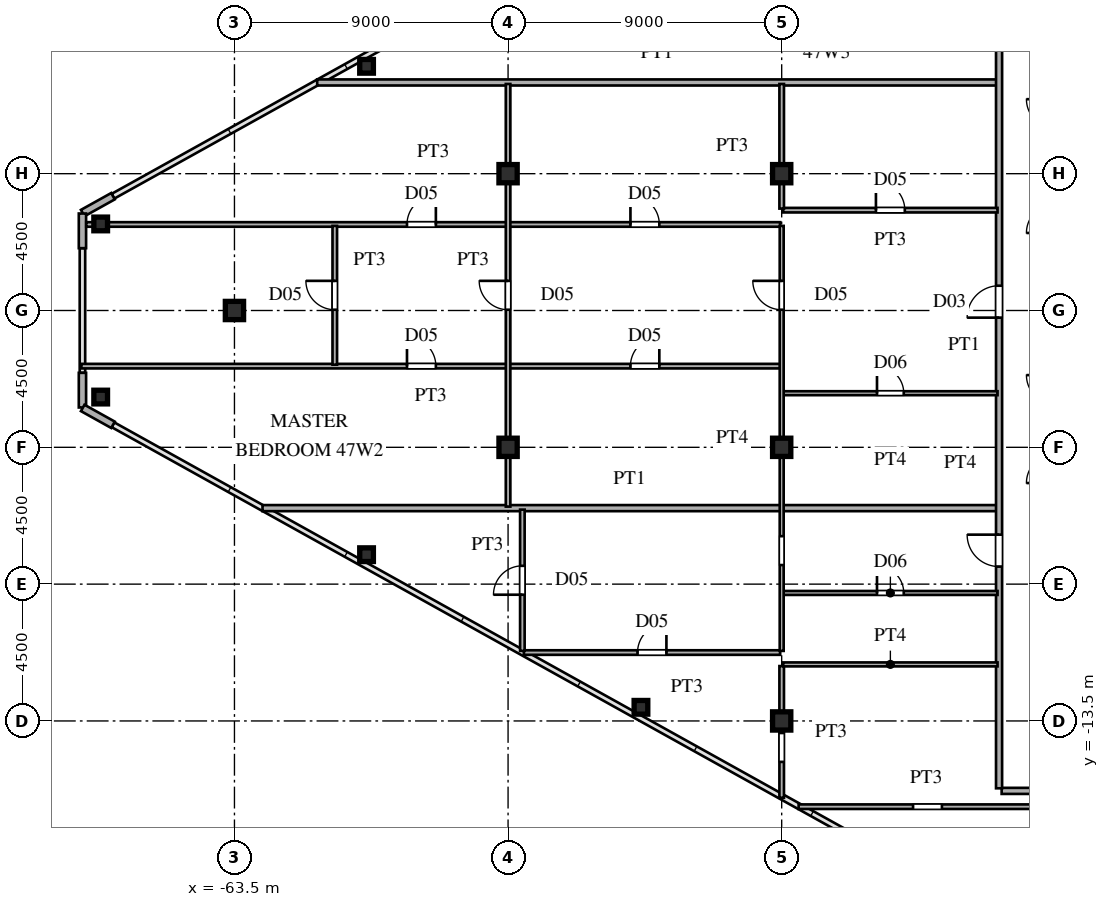
"""IFC4 building model, lengths in metres.
Left out: names, types, materials, properties, quantities, classifications, styles, units other than length and angle.
Written with IfcOpenShell. Run it as: python <this file> out.ifc"""

import sys

from ifc_helpers import new_model, si_unit, direction, frame, frame_2d, origin, origin_2d, place, context, subcontext, project, spatial, rectangle, hollow_rectangle, i_section, extrude, source, transform, mapped, element, fill, save


model = new_model("IFC4")
c1 = context("Model", 3, precision=1e-05, world=origin(), true_north=direction((0.0, 1.0)))
c2 = subcontext(c1, "Body", "Model", "MODEL_VIEW")
j1 = project(units=[si_unit("LENGTHUNIT", "METRE"), si_unit("PLANEANGLEUNIT", "RADIAN")], contexts=[c1])
p1 = place(None, origin())
s1 = spatial("IfcSite", under=j1, at=p1, CompositionType="ELEMENT")
p2 = place(p1, origin())
s2 = spatial("IfcBuilding", under=s1, at=p2, CompositionType="ELEMENT")
p3 = place(p2, frame((0.0, 0.0, 177.9)))
s3 = spatial("IfcBuildingStorey", under=s2, at=p3, CompositionType="ELEMENT", Elevation=177.9)
m1 = source(origin(), c2, "Body", "SweptSolid", [
    extrude(i_section(OverallWidth=0.6, OverallDepth=0.6, WebThickness=0.025, FlangeThickness=0.04, at=origin_2d()), origin(), (0.0, 0.0, 1.0), 3.6),
])
for number, where, z_axis, x_axis in (
    (1, (-45.5, -13.5, 0.0), (0.0, 0.0, 1.0), (1.0, 0.0, 0.0)),
    (2, (-45.5, -4.5, 0.0), (0.0, 0.0, 1.0), (1.0, 0.0, 0.0)),
    (3, (-45.5, 4.5, 0.0), (0.0, 0.0, 1.0), (1.0, 0.0, 0.0)),
    (4, (-54.5, -4.5, 0.0), (0.0, 0.0, 1.0), (1.0, 0.0, 0.0)),
    (5, (-54.5, 4.5, 0.0), (0.0, 0.0, 1.0), (1.0, 0.0, 0.0)),
    (6, (-63.5, 0.0, 0.0), (0.0, 0.0, 1.0), (1.0, 0.0, 0.0)),
):
    element("IfcColumn", number, at=place(p3, frame(where, z_axis=z_axis, x_axis=x_axis)), inside=s3, PredefinedType="COLUMN", context=c2, shape_type="MappedRepresentation", body=[
        mapped(m1, transform((0.0, 0.0, 0.0), scale=1.0)),
    ])
m2 = source(origin(), c2, "Body", "SweptSolid", [
    extrude(hollow_rectangle(XDim=0.45, YDim=0.45, WallThickness=0.018, at=origin_2d()), origin(), (0.0, 0.0, 1.0), 3.6),
])
for number, where, z_axis, x_axis in (
    (7, (-67.9, 2.847, 0.0), (0.0, 0.0, 1.0), (1.0, 0.0, 0.0)),
    (8, (-67.9, -2.847, 0.0), (0.0, 0.0, 1.0), (1.0, 0.0, 0.0)),
    (9, (-50.129, -13.051, 0.0), (0.0, 0.0, 1.0), (1.0, 0.0, 0.0)),
    (10, (-59.155, -8.031, 0.0), (0.0, 0.0, 1.0), (1.0, 0.0, 0.0)),
    (11, (-59.155, 8.031, 0.0), (0.0, 0.0, 1.0), (1.0, 0.0, 0.0)),
):
    element("IfcColumn", number, at=place(p3, frame(where, z_axis=z_axis, x_axis=x_axis)), inside=s3, PredefinedType="COLUMN", context=c2, shape_type="MappedRepresentation", body=[
        mapped(m2, transform((0.0, 0.0, 0.0), scale=1.0)),
    ])
for number, where, z_axis, x_axis in (
    (12, (-67.495, 3.759, 0.0), (0.0, 0.0, 1.0), (-0.874, -0.486, 0.0)),
    (13, (-68.5, 3.19, 0.0), (0.0, 0.0, 1.0), (0.0, -1.0, 0.0)),
    (14, (-68.5, -2.05, 0.0), (0.0, 0.0, 1.0), (0.0, -1.0, 0.0)),
    (15, (-68.491, -3.205, 0.0), (0.0, 0.0, 1.0), (0.874, -0.486, 0.0)),
):
    element("IfcWall", number, at=place(p3, frame(where, z_axis=z_axis, x_axis=x_axis)), inside=s3, PredefinedType="SOLIDWALL", context=c2, shape_type="SweptSolid", body=[
        extrude(rectangle(XDim=1.14, YDim=0.24, at=frame_2d((0.57, 0.0))), origin(), (0.0, 0.0, 1.0), 3.38),
    ])
p4 = place(p3, frame((-44.943, -16.32, 0.0), z_axis=(0.0, 0.0, 1.0), x_axis=(1.0, 0.0, 0.0)))
e16 = element("IfcWall", 16, at=p4, inside=s3, PredefinedType="PARTITIONING", context=c2, shape_type="SweptSolid", body=[
    extrude(rectangle(XDim=8.393, YDim=0.15, at=frame_2d((4.197, 0.0))), origin(), (0.0, 0.0, 1.0), 3.38),
])
p5 = place(p4, frame((3.764, 0.0, 0.0)))
e17 = element("IfcOpeningElement", 17, at=p5, cuts=e16, PredefinedType="OPENING", context=c2, shape_type="SweptSolid", body=[
    extrude(rectangle(XDim=0.95, YDim=2.15, at=frame_2d((0.475, 1.075))), frame((0.0, 0.085, 0.0), z_axis=(0.0, -1.0, 0.0), x_axis=(1.0, 0.0, 0.0)), (0.0, 0.0, 1.0), 0.17),
])
p6 = place(p3, frame((-38.265, -15.8, 0.0), z_axis=(0.0, 0.0, 1.0), x_axis=(1.0, 0.0, 0.0)))
e18 = element("IfcWall", 18, at=p6, inside=s3, PredefinedType="PARTITIONING", context=c2, shape_type="SweptSolid", body=[
    extrude(rectangle(XDim=10.765, YDim=0.2, at=frame_2d((5.382, 0.0))), origin(), (0.0, 0.0, 1.0), 3.38),
])
p7 = place(p3, frame((-45.45, -11.64, 0.0), z_axis=(0.0, 0.0, 1.0), x_axis=(1.0, 0.0, 0.0)))
e19 = element("IfcWall", 19, at=p7, inside=s3, PredefinedType="PARTITIONING", context=c2, shape_type="SweptSolid", body=[
    extrude(rectangle(XDim=7.05, YDim=0.13, at=frame_2d((3.525, 0.0))), origin(), (0.0, 0.0, 1.0), 3.38),
])
p8 = place(p3, frame((-53.983, -11.25, 0.0), z_axis=(0.0, 0.0, 1.0), x_axis=(1.0, 0.0, 0.0)))
e20 = element("IfcWall", 20, at=p8, inside=s3, PredefinedType="PARTITIONING", context=c2, shape_type="SweptSolid", body=[
    extrude(rectangle(XDim=8.433, YDim=0.15, at=frame_2d((4.216, 0.0))), origin(), (0.0, 0.0, 1.0), 3.38),
])
p9 = place(p8, frame((3.741, 0.0, 0.0)))
e21 = element("IfcOpeningElement", 21, at=p9, cuts=e20, PredefinedType="OPENING", context=c2, shape_type="SweptSolid", body=[
    extrude(rectangle(XDim=0.95, YDim=2.15, at=frame_2d((0.475, 1.075))), frame((0.0, 0.085, 0.0), z_axis=(0.0, -1.0, 0.0), x_axis=(1.0, 0.0, 0.0)), (0.0, 0.0, 1.0), 0.17),
])
p10 = place(p3, frame((-45.45, -9.29, 0.0), z_axis=(0.0, 0.0, 1.0), x_axis=(1.0, 0.0, 0.0)))
e22 = element("IfcWall", 22, at=p10, inside=s3, PredefinedType="PARTITIONING", context=c2, shape_type="SweptSolid", body=[
    extrude(rectangle(XDim=7.05, YDim=0.13, at=frame_2d((3.525, 0.0))), origin(), (0.0, 0.0, 1.0), 3.38),
])
p11 = place(p10, frame((3.085, 0.0, 0.0)))
e23 = element("IfcOpeningElement", 23, at=p11, cuts=e22, PredefinedType="OPENING", context=c2, shape_type="SweptSolid", body=[
    extrude(rectangle(XDim=0.88, YDim=2.1, at=frame_2d((0.44, 1.05))), frame((0.0, 0.075, 0.0), z_axis=(0.0, -1.0, 0.0), x_axis=(1.0, 0.0, 0.0)), (0.0, 0.0, 1.0), 0.15),
])
p12 = place(p3, frame((-62.577, -6.5, 0.0), z_axis=(0.0, 0.0, 1.0), x_axis=(1.0, 0.0, 0.0)))
e24 = element("IfcWall", 24, at=p12, inside=s3, PredefinedType="PARTITIONING", context=c2, shape_type="SweptSolid", body=[
    extrude(rectangle(XDim=24.147, YDim=0.2, at=frame_2d((12.073, 0.0))), origin(), (0.0, 0.0, 1.0), 3.38),
])
p13 = place(p3, frame((-45.45, -2.72, 0.0), z_axis=(0.0, 0.0, 1.0), x_axis=(1.0, 0.0, 0.0)))
e25 = element("IfcWall", 25, at=p13, inside=s3, PredefinedType="PARTITIONING", context=c2, shape_type="SweptSolid", body=[
    extrude(rectangle(XDim=7.05, YDim=0.13, at=frame_2d((3.525, 0.0))), origin(), (0.0, 0.0, 1.0), 3.38),
])
p14 = place(p13, frame((3.085, 0.0, 0.0)))
e26 = element("IfcOpeningElement", 26, at=p14, cuts=e25, PredefinedType="OPENING", context=c2, shape_type="SweptSolid", body=[
    extrude(rectangle(XDim=0.88, YDim=2.1, at=frame_2d((0.44, 1.05))), frame((0.0, 0.075, 0.0), z_axis=(0.0, -1.0, 0.0), x_axis=(1.0, 0.0, 0.0)), (0.0, 0.0, 1.0), 0.15),
])
p15 = place(p3, frame((-68.535, -1.83, 0.0), z_axis=(0.0, 0.0, 1.0), x_axis=(1.0, 0.0, 0.0)))
e27 = element("IfcWall", 27, at=p15, inside=s3, PredefinedType="PARTITIONING", context=c2, shape_type="SweptSolid", body=[
    extrude(rectangle(XDim=22.985, YDim=0.15, at=frame_2d((11.492, 0.0))), origin(), (0.0, 0.0, 1.0), 3.38),
])
p16 = place(p15, frame((18.06, 0.0, 0.0)))
e28 = element("IfcOpeningElement", 28, at=p16, cuts=e27, PredefinedType="OPENING", context=c2, shape_type="SweptSolid", body=[
    extrude(rectangle(XDim=0.95, YDim=2.15, at=frame_2d((0.475, 1.075))), frame((0.0, 0.085, 0.0), z_axis=(0.0, -1.0, 0.0), x_axis=(1.0, 0.0, 0.0)), (0.0, 0.0, 1.0), 0.17),
])
p17 = place(p15, frame((10.71, 0.0, 0.0)))
e29 = element("IfcOpeningElement", 29, at=p17, cuts=e27, PredefinedType="OPENING", context=c2, shape_type="SweptSolid", body=[
    extrude(rectangle(XDim=0.95, YDim=2.15, at=frame_2d((0.475, 1.075))), frame((0.0, 0.085, 0.0), z_axis=(0.0, -1.0, 0.0), x_axis=(1.0, 0.0, 0.0)), (0.0, 0.0, 1.0), 0.17),
])
p18 = place(p3, frame((-68.375, 2.83, 0.0), z_axis=(0.0, 0.0, 1.0), x_axis=(1.0, 0.0, 0.0)))
e30 = element("IfcWall", 30, at=p18, inside=s3, PredefinedType="PARTITIONING", context=c2, shape_type="SweptSolid", body=[
    extrude(rectangle(XDim=22.825, YDim=0.15, at=frame_2d((11.413, 0.0))), origin(), (0.0, 0.0, 1.0), 3.38),
])
p19 = place(p18, frame((17.9, 0.0, 0.0)))
e31 = element("IfcOpeningElement", 31, at=p19, cuts=e30, PredefinedType="OPENING", context=c2, shape_type="SweptSolid", body=[
    extrude(rectangle(XDim=0.95, YDim=2.15, at=frame_2d((0.475, 1.075))), frame((0.0, 0.085, 0.0), z_axis=(0.0, -1.0, 0.0), x_axis=(1.0, 0.0, 0.0)), (0.0, 0.0, 1.0), 0.17),
])
p20 = place(p18, frame((10.55, 0.0, 0.0)))
e32 = element("IfcOpeningElement", 32, at=p20, cuts=e30, PredefinedType="OPENING", context=c2, shape_type="SweptSolid", body=[
    extrude(rectangle(XDim=0.95, YDim=2.15, at=frame_2d((0.475, 1.075))), frame((0.0, 0.085, 0.0), z_axis=(0.0, -1.0, 0.0), x_axis=(1.0, 0.0, 0.0)), (0.0, 0.0, 1.0), 0.17),
])
p21 = place(p3, frame((-45.45, 3.3, 0.0), z_axis=(0.0, 0.0, 1.0), x_axis=(1.0, 0.0, 0.0)))
e33 = element("IfcWall", 33, at=p21, inside=s3, PredefinedType="PARTITIONING", context=c2, shape_type="SweptSolid", body=[
    extrude(rectangle(XDim=7.05, YDim=0.15, at=frame_2d((3.525, 0.0))), origin(), (0.0, 0.0, 1.0), 3.38),
])
p22 = place(p21, frame((3.05, 0.0, 0.0)))
e34 = element("IfcOpeningElement", 34, at=p22, cuts=e33, PredefinedType="OPENING", context=c2, shape_type="SweptSolid", body=[
    extrude(rectangle(XDim=0.95, YDim=2.15, at=frame_2d((0.475, 1.075))), frame((0.0, 0.085, 0.0), z_axis=(0.0, -1.0, 0.0), x_axis=(1.0, 0.0, 0.0)), (0.0, 0.0, 1.0), 0.17),
])
p23 = place(p3, frame((-60.779, 7.5, 0.0), z_axis=(0.0, 0.0, 1.0), x_axis=(1.0, 0.0, 0.0)))
e35 = element("IfcWall", 35, at=p23, inside=s3, PredefinedType="PARTITIONING", context=c2, shape_type="SweptSolid", body=[
    extrude(rectangle(XDim=22.349, YDim=0.2, at=frame_2d((11.175, 0.0))), origin(), (0.0, 0.0, 1.0), 3.38),
])
p24 = place(p3, frame((-60.2, -1.783, 0.0), z_axis=(0.0, 0.0, 1.0), x_axis=(0.0, 1.0, 0.0)))
e36 = element("IfcWall", 36, at=p24, inside=s3, PredefinedType="PARTITIONING", context=c2, shape_type="SweptSolid", body=[
    extrude(rectangle(XDim=4.566, YDim=0.15, at=frame_2d((2.283, 0.0))), origin(), (0.0, 0.0, 1.0), 3.38),
])
p25 = place(p24, frame((1.808, 0.0, 0.0)))
e37 = element("IfcOpeningElement", 37, at=p25, cuts=e36, PredefinedType="OPENING", context=c2, shape_type="SweptSolid", body=[
    extrude(rectangle(XDim=0.95, YDim=2.15, at=frame_2d((0.475, 1.075))), frame((0.0, 0.085, 0.0), z_axis=(0.0, -1.0, 0.0), x_axis=(1.0, 0.0, 0.0)), (0.0, 0.0, 1.0), 0.17),
])
p26 = place(p3, frame((-54.5, -6.45, 0.0), z_axis=(0.0, 0.0, 1.0), x_axis=(0.0, 1.0, 0.0)))
e38 = element("IfcWall", 38, at=p26, inside=s3, PredefinedType="PARTITIONING", context=c2, shape_type="SweptSolid", body=[
    extrude(rectangle(XDim=13.9, YDim=0.15, at=frame_2d((6.95, 0.0))), origin(), (0.0, 0.0, 1.0), 2.78),
])
p27 = place(p26, frame((6.475, 0.0, 0.0)))
e39 = element("IfcOpeningElement", 39, at=p27, cuts=e38, PredefinedType="OPENING", context=c2, shape_type="SweptSolid", body=[
    extrude(rectangle(XDim=0.95, YDim=2.15, at=frame_2d((0.475, 1.075))), frame((0.0, 0.085, 0.0), z_axis=(0.0, -1.0, 0.0), x_axis=(1.0, 0.0, 0.0)), (0.0, 0.0, 1.0), 0.17),
])
p28 = place(p3, frame((-54.03, -11.196, 0.0), z_axis=(0.0, 0.0, 1.0), x_axis=(0.0, 1.0, 0.0)))
e40 = element("IfcWall", 40, at=p28, inside=s3, PredefinedType="PARTITIONING", context=c2, shape_type="SweptSolid", body=[
    extrude(rectangle(XDim=4.646, YDim=0.15, at=frame_2d((2.323, 0.0))), origin(), (0.0, 0.0, 1.0), 3.38),
])
p29 = place(p28, frame((1.848, 0.0, 0.0)))
e41 = element("IfcOpeningElement", 41, at=p29, cuts=e40, PredefinedType="OPENING", context=c2, shape_type="SweptSolid", body=[
    extrude(rectangle(XDim=0.95, YDim=2.15, at=frame_2d((0.475, 1.075))), frame((0.0, 0.085, 0.0), z_axis=(0.0, -1.0, 0.0), x_axis=(1.0, 0.0, 0.0)), (0.0, 0.0, 1.0), 0.17),
])
p30 = place(p3, frame((-45.5, -16.027, 0.0), z_axis=(0.0, 0.0, 1.0), x_axis=(0.0, 1.0, 0.0)))
e42 = element("IfcWall", 42, at=p30, inside=s3, PredefinedType="PARTITIONING", context=c2, shape_type="SweptSolid", body=[
    extrude(rectangle(XDim=4.332, YDim=0.15, at=frame_2d((2.166, 0.0))), origin(), (0.0, 0.0, 1.0), 2.78),
])
p31 = place(p30, frame((1.181, 0.0, 0.0)))
e43 = element("IfcOpeningElement", 43, at=p31, cuts=e42, PredefinedType="OPENING", context=c2, shape_type="SweptSolid", body=[
    extrude(rectangle(XDim=0.95, YDim=2.15, at=frame_2d((0.475, 1.075))), frame((0.0, 0.085, 0.0), z_axis=(0.0, -1.0, 0.0), x_axis=(1.0, 0.0, 0.0)), (0.0, 0.0, 1.0), 0.17),
])
p32 = place(p3, frame((-45.5, -11.196, 0.0), z_axis=(0.0, 0.0, 1.0), x_axis=(0.0, 1.0, 0.0)))
e44 = element("IfcWall", 44, at=p32, inside=s3, PredefinedType="PARTITIONING", context=c2, shape_type="SweptSolid", body=[
    extrude(rectangle(XDim=13.979, YDim=0.13, at=frame_2d((6.99, 0.0))), origin(), (0.0, 0.0, 1.0), 2.78),
])
p33 = place(p32, frame((2.823, 0.0, 0.0)))
e45 = element("IfcOpeningElement", 45, at=p33, cuts=e44, PredefinedType="OPENING", context=c2, shape_type="SweptSolid", body=[
    extrude(rectangle(XDim=0.95, YDim=2.15, at=frame_2d((0.475, 1.075))), frame((0.0, 0.075, 0.0), z_axis=(0.0, -1.0, 0.0), x_axis=(1.0, 0.0, 0.0)), (0.0, 0.0, 1.0), 0.15),
])
p34 = place(p32, frame((11.221, 0.0, 0.0)))
e46 = element("IfcOpeningElement", 46, at=p34, cuts=e44, PredefinedType="OPENING", context=c2, shape_type="SweptSolid", body=[
    extrude(rectangle(XDim=0.95, YDim=2.15, at=frame_2d((0.475, 1.075))), frame((0.0, 0.075, 0.0), z_axis=(0.0, -1.0, 0.0), x_axis=(1.0, 0.0, 0.0)), (0.0, 0.0, 1.0), 0.15),
])
p35 = place(p3, frame((-45.5, 3.352, 0.0), z_axis=(0.0, 0.0, 1.0), x_axis=(0.0, 1.0, 0.0)))
e47 = element("IfcWall", 47, at=p35, inside=s3, PredefinedType="PARTITIONING", context=c2, shape_type="SweptSolid", body=[
    extrude(rectangle(XDim=4.098, YDim=0.15, at=frame_2d((2.049, 0.0))), origin(), (0.0, 0.0, 1.0), 2.78),
])
p36 = place(p3, frame((-38.35, -15.715, 0.0), z_axis=(0.0, 0.0, 1.0), x_axis=(0.0, 1.0, 0.0)))
e48 = element("IfcWall", 48, at=p36, inside=s3, PredefinedType="PARTITIONING", context=c2, shape_type="SweptSolid", body=[
    extrude(rectangle(XDim=31.43, YDim=0.2, at=frame_2d((15.715, 0.0))), origin(), (0.0, 0.0, 1.0), 3.38),
])
p37 = place(p36, frame((7.292, 0.0, 0.0)))
e49 = element("IfcOpeningElement", 49, at=p37, cuts=e48, PredefinedType="OPENING", context=c2, shape_type="SweptSolid", body=[
    extrude(rectangle(XDim=1.05, YDim=2.25, at=frame_2d((0.525, 1.125))), frame((0.0, 0.11, 0.0), z_axis=(0.0, -1.0, 0.0), x_axis=(1.0, 0.0, 0.0)), (0.0, 0.0, 1.0), 0.22),
])
p38 = place(p36, frame((15.48, 0.0, 0.0)))
e50 = element("IfcOpeningElement", 50, at=p38, cuts=e48, PredefinedType="OPENING", context=c2, shape_type="SweptSolid", body=[
    extrude(rectangle(XDim=1.05, YDim=2.25, at=frame_2d((0.525, 1.125))), frame((0.0, 0.11, 0.0), z_axis=(0.0, -1.0, 0.0), x_axis=(1.0, 0.0, 0.0)), (0.0, 0.0, 1.0), 0.22),
])
p39 = place(p36, frame((26.84, 0.0, 0.0)))
e51 = element("IfcOpeningElement", 51, at=p39, cuts=e48, PredefinedType="OPENING", context=c2, shape_type="SweptSolid", body=[
    extrude(rectangle(XDim=1.05, YDim=2.25, at=frame_2d((0.525, 1.125))), frame((0.0, 0.11, 0.0), z_axis=(0.0, -1.0, 0.0), x_axis=(1.0, 0.0, 0.0)), (0.0, 0.0, 1.0), 0.22),
])
m3 = source(origin(), c2, "Body", "SweptSolid", [
    extrude(rectangle(XDim=0.95, YDim=2.15, at=frame_2d((0.475, 1.075))), frame((0.0, 0.025, 0.0), z_axis=(0.0, -1.0, 0.0), x_axis=(1.0, 0.0, 0.0)), (0.0, 0.0, 1.0), 0.05),
])
p40 = place(p9, origin())
e52 = element("IfcDoor", 52, at=p40, inside=s3, OperationType="SINGLE_SWING_RIGHT", PredefinedType="DOOR", context=c2, shape_type="MappedRepresentation", body=[
    mapped(m3, transform((0.0, 0.0, 0.0), scale=1.0)),
])
fill(e21, e52)
m4 = source(origin(), c2, "Body", "SweptSolid", [
    extrude(rectangle(XDim=0.88, YDim=2.1, at=frame_2d((0.44, 1.05))), frame((0.0, 0.025, 0.0), z_axis=(0.0, -1.0, 0.0), x_axis=(1.0, 0.0, 0.0)), (0.0, 0.0, 1.0), 0.05),
])
p41 = place(p11, origin())
e53 = element("IfcDoor", 53, at=p41, inside=s3, OperationType="SINGLE_SWING_LEFT", PredefinedType="DOOR", context=c2, shape_type="MappedRepresentation", body=[
    mapped(m4, transform((0.0, 0.0, 0.0), scale=1.0)),
])
fill(e23, e53)
p42 = place(p14, origin())
e54 = element("IfcDoor", 54, at=p42, inside=s3, OperationType="SINGLE_SWING_LEFT", PredefinedType="DOOR", context=c2, shape_type="MappedRepresentation", body=[
    mapped(m4, transform((0.0, 0.0, 0.0), scale=1.0)),
])
fill(e26, e54)
p43 = place(p16, origin())
e55 = element("IfcDoor", 55, at=p43, inside=s3, OperationType="SINGLE_SWING_RIGHT", PredefinedType="DOOR", context=c2, shape_type="MappedRepresentation", body=[
    mapped(m3, transform((0.0, 0.0, 0.0), scale=1.0)),
])
fill(e28, e55)
p44 = place(p17, origin())
e56 = element("IfcDoor", 56, at=p44, inside=s3, OperationType="SINGLE_SWING_LEFT", PredefinedType="DOOR", context=c2, shape_type="MappedRepresentation", body=[
    mapped(m3, transform((0.0, 0.0, 0.0), scale=1.0)),
])
fill(e29, e56)
p45 = place(p19, origin())
e57 = element("IfcDoor", 57, at=p45, inside=s3, OperationType="SINGLE_SWING_LEFT", PredefinedType="DOOR", context=c2, shape_type="MappedRepresentation", body=[
    mapped(m3, transform((0.0, 0.0, 0.0), scale=1.0)),
])
fill(e31, e57)
p46 = place(p20, origin())
e58 = element("IfcDoor", 58, at=p46, inside=s3, OperationType="SINGLE_SWING_RIGHT", PredefinedType="DOOR", context=c2, shape_type="MappedRepresentation", body=[
    mapped(m3, transform((0.0, 0.0, 0.0), scale=1.0)),
])
fill(e32, e58)
p47 = place(p22, origin())
e59 = element("IfcDoor", 59, at=p47, inside=s3, OperationType="SINGLE_SWING_LEFT", PredefinedType="DOOR", context=c2, shape_type="MappedRepresentation", body=[
    mapped(m3, transform((0.0, 0.0, 0.0), scale=1.0)),
])
fill(e34, e59)
p48 = place(p25, origin())
e60 = element("IfcDoor", 60, at=p48, inside=s3, OperationType="SINGLE_SWING_RIGHT", PredefinedType="DOOR", context=c2, shape_type="MappedRepresentation", body=[
    mapped(m3, transform((0.0, 0.0, 0.0), scale=1.0)),
])
fill(e37, e60)
p49 = place(p27, origin())
e61 = element("IfcDoor", 61, at=p49, inside=s3, OperationType="SINGLE_SWING_RIGHT", PredefinedType="DOOR", context=c2, shape_type="MappedRepresentation", body=[
    mapped(m3, transform((0.0, 0.0, 0.0), scale=1.0)),
])
fill(e39, e61)
p50 = place(p29, origin())
e62 = element("IfcDoor", 62, at=p50, inside=s3, OperationType="SINGLE_SWING_LEFT", PredefinedType="DOOR", context=c2, shape_type="MappedRepresentation", body=[
    mapped(m3, transform((0.0, 0.0, 0.0), scale=1.0)),
])
fill(e41, e62)
p51 = place(p34, origin())
e63 = element("IfcDoor", 63, at=p51, inside=s3, OperationType="SINGLE_SWING_RIGHT", PredefinedType="DOOR", context=c2, shape_type="MappedRepresentation", body=[
    mapped(m3, transform((0.0, 0.0, 0.0), scale=1.0)),
])
fill(e46, e63)
m5 = source(origin(), c2, "Body", "SweptSolid", [
    extrude(rectangle(XDim=1.05, YDim=2.25, at=frame_2d((0.525, 1.125))), frame((0.0, 0.025, 0.0), z_axis=(0.0, -1.0, 0.0), x_axis=(1.0, 0.0, 0.0)), (0.0, 0.0, 1.0), 0.05),
])
p52 = place(p37, origin())
e64 = element("IfcDoor", 64, at=p52, inside=s3, OperationType="SINGLE_SWING_RIGHT", PredefinedType="DOOR", context=c2, shape_type="MappedRepresentation", body=[
    mapped(m5, transform((0.0, 0.0, 0.0), scale=1.0)),
])
fill(e49, e64)
p53 = place(p38, origin())
e65 = element("IfcDoor", 65, at=p53, inside=s3, OperationType="SINGLE_SWING_LEFT", PredefinedType="DOOR", context=c2, shape_type="MappedRepresentation", body=[
    mapped(m5, transform((0.0, 0.0, 0.0), scale=1.0)),
])
fill(e50, e65)
save(model, sys.argv[1])
